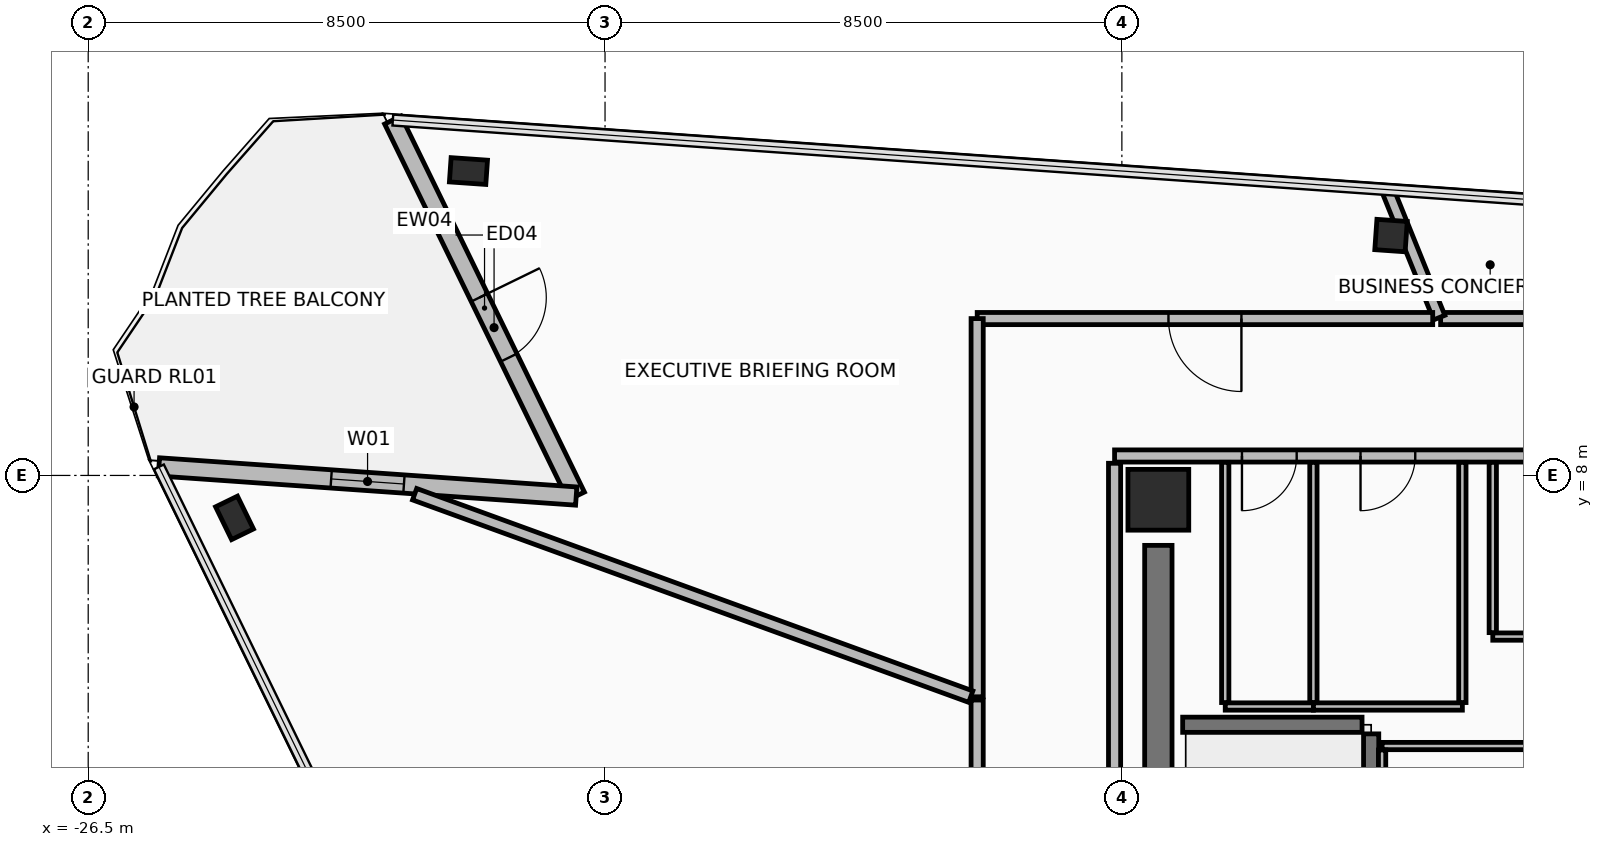
"""IFC4 building model, lengths in metres.
Left out: names, types, materials, properties, quantities, classifications, styles, units other than length and angle.
Written with IfcOpenShell. Run it as: python <this file> out.ifc"""

import sys

from ifc_helpers import new_model, si_unit, direction, frame, frame_2d, origin, origin_2d, place, context, subcontext, project, spatial, rectangle, hollow_rectangle, extrude, element, fill, save


model = new_model("IFC4")
c1 = context("Model", 3, precision=1e-05, world=origin(), true_north=direction((0.0, 1.0)))
c2 = subcontext(c1, "Body", "Model", "MODEL_VIEW")
j1 = project(units=[si_unit("LENGTHUNIT", "METRE"), si_unit("PLANEANGLEUNIT", "RADIAN")], contexts=[c1])
p1 = place(None, origin())
s1 = spatial("IfcSite", under=j1, at=p1, CompositionType="ELEMENT")
p2 = place(p1, origin())
s2 = spatial("IfcBuilding", under=s1, at=p2, CompositionType="ELEMENT")
p3 = place(p2, frame((0.0, 0.0, 234.25)))
s3 = spatial("IfcBuildingStorey", under=s2, at=p3, CompositionType="ELEMENT", Elevation=234.25)
p4 = place(p3, frame((-8.9, 7.6, 0.0), z_axis=(0.0, 0.0, 1.0), x_axis=(1.0, 0.0, 0.0)))
e1 = element("IfcColumn", 1, at=p4, inside=s3, PredefinedType="COLUMN", context=c2, shape_type="SweptSolid", body=[
    extrude(rectangle(XDim=1.0, YDim=1.0, at=origin_2d()), origin(), (0.0, 0.0, 1.0), 3.6),
])
p5 = place(p3, frame((-24.094, 7.302, 0.0), z_axis=(0.0, 0.0, 1.0), x_axis=(-0.438371146789, 0.898794046299, 0.0)))
e2 = element("IfcColumn", 2, at=p5, inside=s3, PredefinedType="COLUMN", context=c2, shape_type="SweptSolid", body=[
    extrude(hollow_rectangle(XDim=0.4, YDim=0.6, WallThickness=0.03, at=origin_2d()), origin(), (0.0, 0.0, 1.0), 3.6),
])
p6 = place(p3, frame((-5.073, 11.945, 0.0), z_axis=(0.0, 0.0, 1.0), x_axis=(-0.99756405026, 0.069756473744, 0.0)))
e3 = element("IfcColumn", 3, at=p6, inside=s3, PredefinedType="COLUMN", context=c2, shape_type="SweptSolid", body=[
    extrude(hollow_rectangle(XDim=0.5, YDim=0.5, WallThickness=0.032, at=origin_2d()), origin(), (0.0, 0.0, 1.0), 3.6),
])
p7 = place(p3, frame((-20.246, 13.006, 0.0), z_axis=(0.0, 0.0, 1.0), x_axis=(-0.99756405026, 0.069756473744, 0.0)))
e4 = element("IfcColumn", 4, at=p7, inside=s3, PredefinedType="COLUMN", context=c2, shape_type="SweptSolid", body=[
    extrude(hollow_rectangle(XDim=0.4, YDim=0.6, WallThickness=0.03, at=origin_2d()), origin(), (0.0, 0.0, 1.0), 3.6),
])
p8 = place(p3, frame((-21.49, 13.844, 0.0), z_axis=(0.0, 0.0, 1.0), x_axis=(0.438391471143, -0.898784133165, 0.0)))
e5 = element("IfcWall", 5, at=p8, inside=s3, PredefinedType="STANDARD", context=c2, shape_type="SweptSolid", body=[
    extrude(rectangle(XDim=6.88, YDim=0.3, at=frame_2d((3.44, 0.0))), origin(), (0.0, 0.0, 1.0), 2.765),
])
p9 = place(p8, frame((3.248, 0.0, 0.0)))
e6 = element("IfcOpeningElement", 6, at=p9, cuts=e5, PredefinedType="OPENING", context=c2, shape_type="SweptSolid", body=[
    extrude(rectangle(XDim=1.1, YDim=2.2, at=frame_2d((0.55, 1.1))), frame((0.0, 0.16, 0.0), z_axis=(0.0, -1.0, 0.0), x_axis=(1.0, 0.0, 0.0)), (0.0, 0.0, 1.0), 0.32),
])
p10 = place(p3, frame((-18.474, 7.661, 0.0), z_axis=(0.0, 0.0, 1.0), x_axis=(-0.997565982203, 0.069728840176, 0.0)))
e7 = element("IfcWall", 7, at=p10, inside=s3, PredefinedType="STANDARD", context=c2, shape_type="SweptSolid", body=[
    extrude(rectangle(XDim=6.88, YDim=0.3, at=frame_2d((3.44, 0.0))), origin(), (0.0, 0.0, 1.0), 2.765),
])
p11 = place(p10, frame((2.84, 0.0, 0.485)))
e8 = element("IfcOpeningElement", 8, at=p11, cuts=e7, PredefinedType="OPENING", context=c2, shape_type="SweptSolid", body=[
    extrude(rectangle(XDim=1.2, YDim=2.1, at=frame_2d((0.6, 1.05))), frame((0.0, 0.16, 0.0), z_axis=(0.0, -1.0, 0.0), x_axis=(1.0, 0.0, 0.0)), (0.0, 0.0, 1.0), 0.32),
])
p12 = place(p3, frame((-8.9, -3.85, 0.0), z_axis=(0.0, 0.0, 1.0), x_axis=(0.0, 1.0, 0.0)))
e9 = element("IfcWall", 9, at=p12, inside=s3, PredefinedType="SHEAR", context=c2, shape_type="SweptSolid", body=[
    extrude(rectangle(XDim=10.7, YDim=0.45, at=frame_2d((5.35, 0.0))), origin(), (0.0, 0.0, 1.0), 3.42),
])
p13 = place(p3, frame((9.62, 8.32, 0.0), z_axis=(0.0, 0.0, 1.0), x_axis=(-1.0, 0.0, 0.0)))
e10 = element("IfcWall", 10, at=p13, inside=s3, PredefinedType="PARTITIONING", context=c2, shape_type="SweptSolid", body=[
    extrude(rectangle(XDim=19.24, YDim=0.2, at=frame_2d((9.62, 0.0))), origin(), (0.0, 0.0, 1.0), 2.915),
])
p14 = place(p13, frame((10.97, 0.0, 0.0)))
e11 = element("IfcOpeningElement", 11, at=p14, cuts=e10, PredefinedType="OPENING", context=c2, shape_type="SweptSolid", body=[
    extrude(rectangle(XDim=0.9, YDim=2.1, at=frame_2d((0.45, 1.05))), frame((0.0, 0.11, 0.0), z_axis=(0.0, -1.0, 0.0), x_axis=(1.0, 0.0, 0.0)), (0.0, 0.0, 1.0), 0.22),
])
p15 = place(p13, frame((7.57, 0.0, 0.0)))
e12 = element("IfcOpeningElement", 12, at=p15, cuts=e10, PredefinedType="OPENING", context=c2, shape_type="SweptSolid", body=[
    extrude(rectangle(XDim=0.9, YDim=2.1, at=frame_2d((0.45, 1.05))), frame((0.0, 0.11, 0.0), z_axis=(0.0, -1.0, 0.0), x_axis=(1.0, 0.0, 0.0)), (0.0, 0.0, 1.0), 0.22),
])
p16 = place(p13, frame((16.245, 0.0, 0.0)))
e13 = element("IfcOpeningElement", 13, at=p16, cuts=e10, PredefinedType="OPENING", context=c2, shape_type="SweptSolid", body=[
    extrude(rectangle(XDim=0.9, YDim=2.1, at=frame_2d((0.45, 1.05))), frame((0.0, 0.11, 0.0), z_axis=(0.0, -1.0, 0.0), x_axis=(1.0, 0.0, 0.0)), (0.0, 0.0, 1.0), 0.22),
])
p17 = place(p13, frame((14.295, 0.0, 0.0)))
e14 = element("IfcOpeningElement", 14, at=p17, cuts=e10, PredefinedType="OPENING", context=c2, shape_type="SweptSolid", body=[
    extrude(rectangle(XDim=0.9, YDim=2.1, at=frame_2d((0.45, 1.05))), frame((0.0, 0.11, 0.0), z_axis=(0.0, -1.0, 0.0), x_axis=(1.0, 0.0, 0.0)), (0.0, 0.0, 1.0), 0.22),
])
p18 = place(p3, frame((-9.62, 8.2, 0.0), z_axis=(0.0, 0.0, 1.0), x_axis=(0.0, -1.0, 0.0)))
e15 = element("IfcWall", 15, at=p18, inside=s3, PredefinedType="PARTITIONING", context=c2, shape_type="SweptSolid", body=[
    extrude(rectangle(XDim=16.4, YDim=0.2, at=frame_2d((8.2, 0.0))), origin(), (0.0, 0.0, 1.0), 2.765),
])
p19 = place(p18, frame((12.65, 0.0, 0.0)))
e16 = element("IfcOpeningElement", 16, at=p19, cuts=e15, PredefinedType="OPENING", context=c2, shape_type="SweptSolid", body=[
    extrude(rectangle(XDim=1.1, YDim=2.15, at=frame_2d((0.55, 1.075))), frame((0.0, 0.11, 0.0), z_axis=(0.0, -1.0, 0.0), x_axis=(1.0, 0.0, 0.0)), (0.0, 0.0, 1.0), 0.22),
])
p20 = place(p3, frame((-5.4, -3.55, 0.0), z_axis=(0.0, 0.0, 1.0), x_axis=(0.0, 1.0, 0.0)))
e17 = element("IfcWall", 17, at=p20, inside=s3, PredefinedType="SHEAR", context=c2, shape_type="SweptSolid", body=[
    extrude(rectangle(XDim=7.3, YDim=0.25, at=frame_2d((3.65, 0.0))), origin(), (0.0, 0.0, 1.0), 3.42),
])
p21 = place(p3, frame((-8.5, 3.9, 0.0), z_axis=(0.0, 0.0, 1.0), x_axis=(1.0, 0.0, 0.0)))
e18 = element("IfcWall", 18, at=p21, inside=s3, PredefinedType="SHEAR", context=c2, shape_type="SweptSolid", body=[
    extrude(rectangle(XDim=2.95, YDim=0.25, at=frame_2d((1.475, 0.0))), origin(), (0.0, 0.0, 1.0), 3.42),
])
p22 = place(p3, frame((-2.115, 3.55, 0.0), z_axis=(0.0, 0.0, 1.0), x_axis=(-1.0, 0.0, 0.0)))
e19 = element("IfcWall", 19, at=p22, inside=s3, PredefinedType="PARTITIONING", context=c2, shape_type="SweptSolid", body=[
    extrude(rectangle(XDim=3.105, YDim=0.12, at=frame_2d((1.552, 0.0))), origin(), (0.0, 0.0, 1.0), 3.42),
])
p23 = place(p3, frame((-5.22, 3.485, 0.0), z_axis=(0.0, 0.0, 1.0), x_axis=(0.0, -1.0, 0.0)))
e20 = element("IfcWall", 20, at=p23, inside=s3, PredefinedType="PARTITIONING", context=c2, shape_type="SweptSolid", body=[
    extrude(rectangle(XDim=2.97, YDim=0.12, at=frame_2d((1.485, 0.0))), origin(), (0.0, 0.0, 1.0), 3.42),
])
p24 = place(p3, frame((-3.4, 5.35, 0.0), z_axis=(0.0, 0.0, 1.0), x_axis=(1.0, 0.0, 0.0)))
e21 = element("IfcWall", 21, at=p24, inside=s3, PredefinedType="PARTITIONING", context=c2, shape_type="SweptSolid", body=[
    extrude(rectangle(XDim=3.2, YDim=0.12, at=frame_2d((1.6, 0.0))), origin(), (0.0, 0.0, 1.0), 3.42),
])
p25 = place(p3, frame((-3.4, 8.215, 0.0), z_axis=(0.0, 0.0, 1.0), x_axis=(0.0, -1.0, 0.0)))
e22 = element("IfcWall", 22, at=p25, inside=s3, PredefinedType="PARTITIONING", context=c2, shape_type="SweptSolid", body=[
    extrude(rectangle(XDim=2.8, YDim=0.12, at=frame_2d((1.4, 0.0))), origin(), (0.0, 0.0, 1.0), 2.715),
])
p26 = place(p3, frame((-7.8, 4.2, 0.0), z_axis=(0.0, 0.0, 1.0), x_axis=(1.0, 0.0, 0.0)))
e23 = element("IfcWall", 23, at=p26, inside=s3, PredefinedType="PARTITIONING", context=c2, shape_type="SweptSolid", body=[
    extrude(rectangle(XDim=1.45, YDim=0.12, at=frame_2d((0.725, 0.0))), origin(), (0.0, 0.0, 1.0), 3.42),
])
for number, where, z_axis, x_axis in (
    (24, (-6.35, 4.265, 0.0), (0.0, 0.0, 1.0), (0.0, 1.0, 0.0)),
    (25, (-7.8, 8.215, 0.0), (0.0, 0.0, 1.0), (0.0, -1.0, 0.0)),
):
    element("IfcWall", number, at=place(p3, frame(where, z_axis=z_axis, x_axis=x_axis)), inside=s3, PredefinedType="PARTITIONING", context=c2, shape_type="SweptSolid", body=[
        extrude(rectangle(XDim=3.95, YDim=0.12, at=frame_2d((1.975, 0.0))), origin(), (0.0, 0.0, 1.0), 2.715),
    ])
p27 = place(p3, frame((-6.35, 4.2, 0.0), z_axis=(0.0, 0.0, 1.0), x_axis=(1.0, 0.0, 0.0)))
e26 = element("IfcWall", 26, at=p27, inside=s3, PredefinedType="PARTITIONING", context=c2, shape_type="SweptSolid", body=[
    extrude(rectangle(XDim=2.45, YDim=0.12, at=frame_2d((1.225, 0.0))), origin(), (0.0, 0.0, 1.0), 3.42),
])
p28 = place(p3, frame((-3.9, 4.265, 0.0), z_axis=(0.0, 0.0, 1.0), x_axis=(0.0, 1.0, 0.0)))
e27 = element("IfcWall", 27, at=p28, inside=s3, PredefinedType="PARTITIONING", context=c2, shape_type="SweptSolid", body=[
    extrude(rectangle(XDim=3.95, YDim=0.12, at=frame_2d((1.975, 0.0))), origin(), (0.0, 0.0, 1.0), 2.715),
])
p29 = place(p3, frame((5.145, 10.58, 0.0), z_axis=(0.0, 0.0, 1.0), x_axis=(-1.0, 0.0, 0.0)))
e28 = element("IfcWall", 28, at=p29, inside=s3, PredefinedType="PARTITIONING", context=c2, shape_type="SweptSolid", body=[
    extrude(rectangle(XDim=9.402, YDim=0.2, at=frame_2d((4.701, 0.0))), origin(), (0.0, 0.0, 1.0), 3.42),
])
p30 = place(p29, frame((4.101, 0.0, 0.0)))
e29 = element("IfcOpeningElement", 29, at=p30, cuts=e28, PredefinedType="OPENING", context=c2, shape_type="SweptSolid", body=[
    extrude(rectangle(XDim=1.2, YDim=2.15, at=frame_2d((0.6, 1.075))), frame((0.0, 0.11, 0.0), z_axis=(0.0, -1.0, 0.0), x_axis=(1.0, 0.0, 0.0)), (0.0, 0.0, 1.0), 0.22),
])
p31 = place(p3, frame((-4.281, 10.596, 0.0), z_axis=(0.0, 0.0, 1.0), x_axis=(-0.374559063523, 0.927203056473, 0.0)))
e30 = element("IfcWall", 30, at=p31, inside=s3, PredefinedType="PARTITIONING", context=c2, shape_type="SweptSolid", body=[
    extrude(rectangle(XDim=2.27, YDim=0.2, at=frame_2d((1.135, 0.0))), origin(), (0.0, 0.0, 1.0), 2.765),
])
p32 = place(p3, frame((-4.388, 10.58, 0.0), z_axis=(0.0, 0.0, 1.0), x_axis=(-1.0, 0.0, 0.0)))
e31 = element("IfcWall", 31, at=p32, inside=s3, PredefinedType="PARTITIONING", context=c2, shape_type="SweptSolid", body=[
    extrude(rectangle(XDim=7.492, YDim=0.2, at=frame_2d((3.746, 0.0))), origin(), (0.0, 0.0, 1.0), 2.915),
])
p33 = place(p32, frame((3.146, 0.0, 0.0)))
e32 = element("IfcOpeningElement", 32, at=p33, cuts=e31, PredefinedType="OPENING", context=c2, shape_type="SweptSolid", body=[
    extrude(rectangle(XDim=1.2, YDim=2.15, at=frame_2d((0.6, 1.075))), frame((0.0, 0.11, 0.0), z_axis=(0.0, -1.0, 0.0), x_axis=(1.0, 0.0, 0.0)), (0.0, 0.0, 1.0), 0.22),
])
p34 = place(p3, frame((-11.88, 10.579, 0.0), z_axis=(0.0, 0.0, 1.0), x_axis=(0.0, -1.0, 0.0)))
e33 = element("IfcWall", 33, at=p34, inside=s3, PredefinedType="PARTITIONING", context=c2, shape_type="SweptSolid", body=[
    extrude(rectangle(XDim=6.22, YDim=0.2, at=frame_2d((3.11, 0.0))), origin(), (0.0, 0.0, 1.0), 2.765),
])
p35 = place(p3, frame((-11.985, 4.362, 0.0), z_axis=(0.0, 0.0, 1.0), x_axis=(-0.939690854179, 0.342024996999, 0.0)))
e34 = element("IfcWall", 34, at=p35, inside=s3, PredefinedType="PARTITIONING", context=c2, shape_type="SweptSolid", body=[
    extrude(rectangle(XDim=9.733, YDim=0.2, at=frame_2d((4.867, 0.0))), origin(), (0.0, 0.0, 1.0), 2.915),
])
p36 = place(p3, frame((-11.88, 4.306, 0.0), z_axis=(0.0, 0.0, 1.0), x_axis=(0.0, -1.0, 0.0)))
e35 = element("IfcWall", 35, at=p36, inside=s3, PredefinedType="PARTITIONING", context=c2, shape_type="SweptSolid", body=[
    extrude(rectangle(XDim=10.608, YDim=0.2, at=frame_2d((5.304, 0.0))), origin(), (0.0, 0.0, 1.0), 3.42),
])
p37 = place(p36, frame((4.804, 0.0, 0.0)))
e36 = element("IfcOpeningElement", 36, at=p37, cuts=e35, PredefinedType="OPENING", context=c2, shape_type="SweptSolid", body=[
    extrude(rectangle(XDim=1.0, YDim=2.15, at=frame_2d((0.5, 1.075))), frame((0.0, 0.11, 0.0), z_axis=(0.0, -1.0, 0.0), x_axis=(1.0, 0.0, 0.0)), (0.0, 0.0, 1.0), 0.22),
])
p38 = place(p9, origin())
e37 = element("IfcDoor", 37, at=p38, inside=s3, OperationType="SINGLE_SWING_LEFT", PredefinedType="DOOR", context=c2, shape_type="SweptSolid", body=[
    extrude(rectangle(XDim=1.1, YDim=2.2, at=frame_2d((0.55, 1.1))), frame((0.0, 0.025, 0.0), z_axis=(0.0, -1.0, 0.0), x_axis=(1.0, 0.0, 0.0)), (0.0, 0.0, 1.0), 0.05),
])
fill(e6, e37)
p39 = place(p11, origin())
e38 = element("IfcWindow", 38, at=p39, inside=s3, PartitioningType="SINGLE_PANEL", PredefinedType="WINDOW", context=c2, shape_type="SweptSolid", body=[
    extrude(rectangle(XDim=1.2, YDim=2.1, at=frame_2d((0.6, 1.05))), frame((0.0, 0.03, 0.0), z_axis=(0.0, -1.0, 0.0), x_axis=(1.0, 0.0, 0.0)), (0.0, 0.0, 1.0), 0.06),
])
fill(e8, e38)
p40 = place(p16, frame((0.9, 0.0, 0.0), z_axis=(0.0, 0.0, 1.0), x_axis=(-1.0, 0.0, 0.0)))
e39 = element("IfcDoor", 39, at=p40, inside=s3, OperationType="SINGLE_SWING_LEFT", PredefinedType="DOOR", context=c2, shape_type="SweptSolid", body=[
    extrude(rectangle(XDim=0.9, YDim=2.1, at=frame_2d((0.45, 1.05))), frame((0.0, 0.025, 0.0), z_axis=(0.0, -1.0, 0.0), x_axis=(1.0, 0.0, 0.0)), (0.0, 0.0, 1.0), 0.05),
])
fill(e13, e39)
p41 = place(p17, frame((0.9, 0.0, 0.0), z_axis=(0.0, 0.0, 1.0), x_axis=(-1.0, 0.0, 0.0)))
e40 = element("IfcDoor", 40, at=p41, inside=s3, OperationType="SINGLE_SWING_LEFT", PredefinedType="DOOR", context=c2, shape_type="SweptSolid", body=[
    extrude(rectangle(XDim=0.9, YDim=2.1, at=frame_2d((0.45, 1.05))), frame((0.0, 0.025, 0.0), z_axis=(0.0, -1.0, 0.0), x_axis=(1.0, 0.0, 0.0)), (0.0, 0.0, 1.0), 0.05),
])
fill(e14, e40)
p42 = place(p33, origin())
e41 = element("IfcDoor", 41, at=p42, inside=s3, OperationType="SINGLE_SWING_LEFT", PredefinedType="DOOR", context=c2, shape_type="SweptSolid", body=[
    extrude(rectangle(XDim=1.2, YDim=2.15, at=frame_2d((0.6, 1.075))), frame((0.0, 0.025, 0.0), z_axis=(0.0, -1.0, 0.0), x_axis=(1.0, 0.0, 0.0)), (0.0, 0.0, 1.0), 0.05),
])
fill(e32, e41)
save(model, sys.argv[1])
